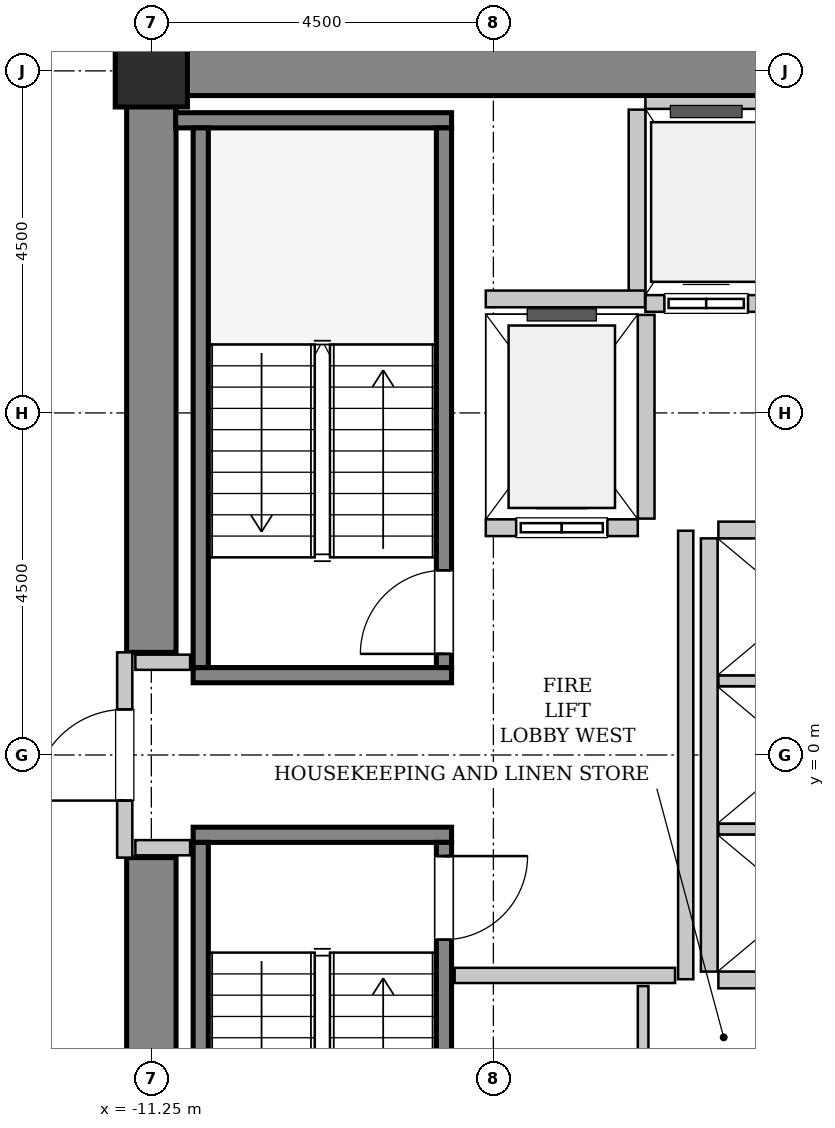
"""IFC4 building model, lengths in metres.
Left out: names, types, materials, properties, quantities, classifications, styles, units other than length and angle.
Written with IfcOpenShell. Run it as: python <this file> out.ifc"""

import sys

from ifc_helpers import new_model, si_unit, direction, frame, frame_2d, origin, origin_2d, place, context, subcontext, project, spatial, rectangle, hollow_rectangle, extrude, source, transform, mapped, element, fill, save


model = new_model("IFC4")
c1 = context("Model", 3, precision=1e-05, world=origin(), true_north=direction((0.0, 1.0)))
c2 = subcontext(c1, "Body", "Model", "MODEL_VIEW")
j1 = project(units=[si_unit("LENGTHUNIT", "METRE"), si_unit("PLANEANGLEUNIT", "RADIAN")], contexts=[c1])
p1 = place(None, origin())
s1 = spatial("IfcSite", under=j1, at=p1, CompositionType="ELEMENT")
p2 = place(p1, origin())
s2 = spatial("IfcBuilding", under=s1, at=p2, CompositionType="ELEMENT")
p3 = place(p2, frame((0.0, 0.0, 59.6)))
s3 = spatial("IfcBuildingStorey", under=s2, at=p3, CompositionType="ELEMENT", Elevation=59.6)
m1 = source(origin(), c2, "Body", "SweptSolid", [
    extrude(rectangle(XDim=10.025, YDim=0.65, at=frame_2d((5.012, 0.0))), origin(), (0.0, 0.0, 1.0), 3.8),
])
p4 = place(p3, frame((-11.575, 9.0, 0.0), z_axis=(0.0, 0.0, 1.0), x_axis=(1.0, 0.0, 0.0)))
e1 = element("IfcWall", 1, at=p4, inside=s3, PredefinedType="SHEAR", context=c2, shape_type="MappedRepresentation", body=[
    mapped(m1, transform((0.0, 0.0, 0.0), x_axis=(1.0, 0.0, 0.0), y_axis=(0.0, 1.0, 0.0), z_axis=(0.0, 0.0, 1.0), scale=1.0)),
])
m2 = source(origin(), c2, "Body", "SweptSolid", [
    extrude(rectangle(XDim=7.325, YDim=0.65, at=frame_2d((3.663, 0.0))), origin(), (0.0, 0.0, 1.0), 3.8),
])
for number, where, z_axis, x_axis in (
    (2, (-11.25, -8.675, 0.0), (0.0, 0.0, 1.0), (0.0, 1.0, 0.0)),
    (3, (-11.25, 1.35, 0.0), (0.0, 0.0, 1.0), (0.0, 1.0, 0.0)),
):
    element("IfcWall", number, at=place(p3, frame(where, z_axis=z_axis, x_axis=x_axis)), inside=s3, PredefinedType="SHEAR", context=c2, shape_type="MappedRepresentation", body=[
        mapped(m2, transform((0.0, 0.0, 0.0), x_axis=(1.0, 0.0, 0.0), y_axis=(0.0, 1.0, 0.0), z_axis=(0.0, 0.0, 1.0), scale=1.0)),
    ])
m3 = source(origin(), c2, "Body", "SweptSolid", [
    extrude(hollow_rectangle(XDim=0.95, YDim=0.95, WallThickness=0.045, InnerFilletRadius=0.045, OuterFilletRadius=0.09, at=origin_2d()), origin(), (0.0, 0.0, 1.0), 3.8),
])
p5 = place(p3, frame((-11.25, 9.0, 0.0), z_axis=(0.0, 0.0, 1.0), x_axis=(1.0, 0.0, 0.0)))
e4 = element("IfcColumn", 4, at=p5, inside=s3, PredefinedType="COLUMN", context=c2, shape_type="MappedRepresentation", body=[
    mapped(m3, transform((0.0, 0.0, 0.0), x_axis=(1.0, 0.0, 0.0), y_axis=(0.0, 1.0, 0.0), z_axis=(0.0, 0.0, 1.0), scale=1.0)),
])
m4 = source(origin(), c2, "Body", "SweptSolid", [
    extrude(rectangle(XDim=3.4, YDim=0.2, at=frame_2d((1.7, 0.0))), origin(), (0.0, 0.0, 1.0), 3.8),
])
p6 = place(p3, frame((-7.3, 1.05, 0.0), z_axis=(0.0, 0.0, 1.0), x_axis=(-1.0, 0.0, 0.0)))
e5 = element("IfcWall", 5, at=p6, inside=s3, PredefinedType="SOLIDWALL", context=c2, shape_type="MappedRepresentation", body=[
    mapped(m4, transform((0.0, 0.0, 0.0), x_axis=(1.0, 0.0, 0.0), y_axis=(0.0, 1.0, 0.0), z_axis=(0.0, 0.0, 1.0), scale=1.0)),
])
m5 = source(origin(), c2, "Body", "SweptSolid", [
    extrude(rectangle(XDim=3.63, YDim=0.2, at=frame_2d((1.815, 0.0))), origin(), (0.0, 0.0, 1.0), 3.8),
])
p7 = place(p3, frame((-7.3, 8.35, 0.0), z_axis=(0.0, 0.0, 1.0), x_axis=(-1.0, 0.0, 0.0)))
e6 = element("IfcWall", 6, at=p7, inside=s3, PredefinedType="SOLIDWALL", context=c2, shape_type="MappedRepresentation", body=[
    mapped(m5, transform((0.0, 0.0, 0.0), x_axis=(1.0, 0.0, 0.0), y_axis=(0.0, 1.0, 0.0), z_axis=(0.0, 0.0, 1.0), scale=1.0)),
])
m6 = source(origin(), c2, "Body", "SweptSolid", [
    extrude(rectangle(XDim=7.1, YDim=0.2, at=frame_2d((3.55, 0.0))), origin(), (0.0, 0.0, 1.0), 3.8),
])
p8 = place(p3, frame((-7.4, 1.15, 0.0), z_axis=(0.0, 0.0, 1.0), x_axis=(0.0, 1.0, 0.0)))
e7 = element("IfcWall", 7, at=p8, inside=s3, PredefinedType="SOLIDWALL", context=c2, shape_type="MappedRepresentation", body=[
    mapped(m6, transform((0.0, 0.0, 0.0), x_axis=(1.0, 0.0, 0.0), y_axis=(0.0, 1.0, 0.0), z_axis=(0.0, 0.0, 1.0), scale=1.0)),
])
p9 = place(p8, frame((0.18, 0.0, 0.0)))
e8 = element("IfcOpeningElement", 8, at=p9, cuts=e7, PredefinedType="OPENING", context=c2, shape_type="SweptSolid", body=[
    extrude(rectangle(XDim=1.1, YDim=2.15, at=frame_2d((0.55, 1.075))), frame((0.0, 0.11, 0.0), z_axis=(0.0, -1.0, 0.0), x_axis=(1.0, 0.0, 0.0)), (0.0, 0.0, 1.0), 0.22),
])
p10 = place(p3, frame((-10.6, 1.15, 0.0), z_axis=(0.0, 0.0, 1.0), x_axis=(0.0, 1.0, 0.0)))
e9 = element("IfcWall", 9, at=p10, inside=s3, PredefinedType="SOLIDWALL", context=c2, shape_type="MappedRepresentation", body=[
    mapped(m6, transform((0.0, 0.0, 0.0), x_axis=(1.0, 0.0, 0.0), y_axis=(0.0, 1.0, 0.0), z_axis=(0.0, 0.0, 1.0), scale=1.0)),
])
p11 = place(p3, frame((-10.7, -1.05, 0.0), z_axis=(0.0, 0.0, 1.0), x_axis=(1.0, 0.0, 0.0)))
e10 = element("IfcWall", 10, at=p11, inside=s3, PredefinedType="SOLIDWALL", context=c2, shape_type="MappedRepresentation", body=[
    mapped(m4, transform((0.0, 0.0, 0.0), x_axis=(1.0, 0.0, 0.0), y_axis=(0.0, 1.0, 0.0), z_axis=(0.0, 0.0, 1.0), scale=1.0)),
])
p12 = place(p3, frame((-10.6, -1.15, 0.0), z_axis=(0.0, 0.0, 1.0), x_axis=(0.0, -1.0, 0.0)))
e11 = element("IfcWall", 11, at=p12, inside=s3, PredefinedType="SOLIDWALL", context=c2, shape_type="MappedRepresentation", body=[
    mapped(m6, transform((0.0, 0.0, 0.0), x_axis=(1.0, 0.0, 0.0), y_axis=(0.0, 1.0, 0.0), z_axis=(0.0, 0.0, 1.0), scale=1.0)),
])
p13 = place(p3, frame((-7.4, -1.15, 0.0), z_axis=(0.0, 0.0, 1.0), x_axis=(0.0, -1.0, 0.0)))
e12 = element("IfcWall", 12, at=p13, inside=s3, PredefinedType="SOLIDWALL", context=c2, shape_type="MappedRepresentation", body=[
    mapped(m6, transform((0.0, 0.0, 0.0), x_axis=(1.0, 0.0, 0.0), y_axis=(0.0, 1.0, 0.0), z_axis=(0.0, 0.0, 1.0), scale=1.0)),
])
p14 = place(p13, frame((0.18, 0.0, 0.0)))
e13 = element("IfcOpeningElement", 13, at=p14, cuts=e12, PredefinedType="OPENING", context=c2, shape_type="SweptSolid", body=[
    extrude(rectangle(XDim=1.1, YDim=2.15, at=frame_2d((0.55, 1.075))), frame((0.0, 0.11, 0.0), z_axis=(0.0, -1.0, 0.0), x_axis=(1.0, 0.0, 0.0)), (0.0, 0.0, 1.0), 0.22),
])
m7 = source(origin(), c2, "Body", "SweptSolid", [
    extrude(rectangle(XDim=2.0, YDim=0.22, at=frame_2d((1.0, 0.0))), origin(), (0.0, 0.0, 1.0), 3.535),
])
p15 = place(p3, frame((-6.85, 2.99, 0.0), z_axis=(0.0, 0.0, 1.0), x_axis=(1.0, 0.0, 0.0)))
e14 = element("IfcWall", 14, at=p15, inside=s3, PredefinedType="SOLIDWALL", context=c2, shape_type="MappedRepresentation", body=[
    mapped(m7, transform((0.0, 0.0, 0.0), x_axis=(1.0, 0.0, 0.0), y_axis=(0.0, 1.0, 0.0), z_axis=(0.0, 0.0, 1.0), scale=1.0)),
])
p16 = place(p15, frame((0.4, 0.0, 0.0)))
e15 = element("IfcOpeningElement", 15, at=p16, cuts=e14, PredefinedType="OPENING", context=c2, shape_type="SweptSolid", body=[
    extrude(rectangle(XDim=1.2, YDim=2.2, at=frame_2d((0.6, 1.1))), frame((0.0, 0.12, 0.0), z_axis=(0.0, -1.0, 0.0), x_axis=(1.0, 0.0, 0.0)), (0.0, 0.0, 1.0), 0.24),
])
m8 = source(origin(), c2, "Body", "SweptSolid", [
    extrude(rectangle(XDim=2.68, YDim=0.22, at=frame_2d((1.34, 0.0))), origin(), (0.0, 0.0, 1.0), 3.535),
])
p17 = place(p3, frame((-4.74, 3.11, 0.0), z_axis=(0.0, 0.0, 1.0), x_axis=(0.0, 1.0, 0.0)))
e16 = element("IfcWall", 16, at=p17, inside=s3, PredefinedType="SOLIDWALL", context=c2, shape_type="MappedRepresentation", body=[
    mapped(m8, transform((0.0, 0.0, 0.0), x_axis=(1.0, 0.0, 0.0), y_axis=(0.0, 1.0, 0.0), z_axis=(0.0, 0.0, 1.0), scale=1.0)),
])
m9 = source(origin(), c2, "Body", "SweptSolid", [
    extrude(rectangle(XDim=3.2, YDim=0.22, at=frame_2d((1.6, 0.0))), origin(), (0.0, 0.0, 1.0), 3.535),
])
p18 = place(p3, frame((-4.75, 5.94, 0.0), z_axis=(0.0, 0.0, 1.0), x_axis=(1.0, 0.0, 0.0)))
e17 = element("IfcWall", 17, at=p18, inside=s3, PredefinedType="SOLIDWALL", context=c2, shape_type="MappedRepresentation", body=[
    mapped(m9, transform((0.0, 0.0, 0.0), x_axis=(1.0, 0.0, 0.0), y_axis=(0.0, 1.0, 0.0), z_axis=(0.0, 0.0, 1.0), scale=1.0)),
])
p19 = place(p18, frame((0.25, 0.0, 0.0)))
e18 = element("IfcOpeningElement", 18, at=p19, cuts=e17, PredefinedType="OPENING", context=c2, shape_type="SweptSolid", body=[
    extrude(rectangle(XDim=1.1, YDim=2.2, at=frame_2d((0.55, 1.1))), frame((0.0, 0.12, 0.0), z_axis=(0.0, -1.0, 0.0), x_axis=(1.0, 0.0, 0.0)), (0.0, 0.0, 1.0), 0.24),
])
p20 = place(p18, frame((1.875, 0.0, 0.0)))
e19 = element("IfcOpeningElement", 19, at=p20, cuts=e17, PredefinedType="OPENING", context=c2, shape_type="SweptSolid", body=[
    extrude(rectangle(XDim=1.1, YDim=2.2, at=frame_2d((0.55, 1.1))), frame((0.0, 0.12, 0.0), z_axis=(0.0, -1.0, 0.0), x_axis=(1.0, 0.0, 0.0)), (0.0, 0.0, 1.0), 0.24),
])
m10 = source(origin(), c2, "Body", "SweptSolid", [
    extrude(rectangle(XDim=3.2, YDim=0.16, at=frame_2d((1.6, 0.0))), origin(), (0.0, 0.0, 1.0), 2.425),
])
p21 = place(p3, frame((-1.55, 8.58, 0.0), z_axis=(0.0, 0.0, 1.0), x_axis=(-1.0, 0.0, 0.0)))
e20 = element("IfcWall", 20, at=p21, inside=s3, PredefinedType="PARTITIONING", context=c2, shape_type="MappedRepresentation", body=[
    mapped(m10, transform((0.0, 0.0, 0.0), x_axis=(1.0, 0.0, 0.0), y_axis=(0.0, 1.0, 0.0), z_axis=(0.0, 0.0, 1.0), scale=1.0)),
])
m11 = source(origin(), c2, "Body", "SweptSolid", [
    extrude(rectangle(XDim=2.43, YDim=0.22, at=frame_2d((1.215, 0.0))), origin(), (0.0, 0.0, 1.0), 3.535),
])
p22 = place(p3, frame((-4.86, 8.49, 0.0), z_axis=(0.0, 0.0, 1.0), x_axis=(0.0, -1.0, 0.0)))
e21 = element("IfcWall", 21, at=p22, inside=s3, PredefinedType="SOLIDWALL", context=c2, shape_type="MappedRepresentation", body=[
    mapped(m11, transform((0.0, 0.0, 0.0), x_axis=(1.0, 0.0, 0.0), y_axis=(0.0, 1.0, 0.0), z_axis=(0.0, 0.0, 1.0), scale=1.0)),
])
m12 = source(origin(), c2, "Body", "SweptSolid", [
    extrude(rectangle(XDim=5.7, YDim=0.22, at=frame_2d((2.85, 0.0))), origin(), (0.0, 0.0, 1.0), 3.535),
])
p23 = place(p3, frame((-3.91, 2.85, 0.0), z_axis=(0.0, 0.0, 1.0), x_axis=(0.0, -1.0, 0.0)))
e22 = element("IfcWall", 22, at=p23, inside=s3, PredefinedType="SOLIDWALL", context=c2, shape_type="MappedRepresentation", body=[
    mapped(m12, transform((0.0, 0.0, 0.0), x_axis=(1.0, 0.0, 0.0), y_axis=(0.0, 1.0, 0.0), z_axis=(0.0, 0.0, 1.0), scale=1.0)),
])
m13 = source(origin(), c2, "Body", "SweptSolid", [
    extrude(rectangle(XDim=2.13, YDim=0.22, at=frame_2d((1.065, 0.0))), origin(), (0.0, 0.0, 1.0), 3.535),
])
p24 = place(p3, frame((-3.79, -2.96, 0.0), z_axis=(0.0, 0.0, 1.0), x_axis=(1.0, 0.0, 0.0)))
e23 = element("IfcWall", 23, at=p24, inside=s3, PredefinedType="SOLIDWALL", context=c2, shape_type="MappedRepresentation", body=[
    mapped(m13, transform((0.0, 0.0, 0.0), x_axis=(1.0, 0.0, 0.0), y_axis=(0.0, 1.0, 0.0), z_axis=(0.0, 0.0, 1.0), scale=1.0)),
])
m14 = source(origin(), c2, "Body", "SweptSolid", [
    extrude(rectangle(XDim=2.13, YDim=0.14, at=frame_2d((1.065, 0.0))), origin(), (0.0, 0.0, 1.0), 3.535),
])
for number, where, z_axis, x_axis in (
    (24, (-3.79, -0.975, 0.0), (0.0, 0.0, 1.0), (1.0, 0.0, 0.0)),
    (25, (-3.79, 0.975, 0.0), (0.0, 0.0, 1.0), (1.0, 0.0, 0.0)),
):
    element("IfcWall", number, at=place(p3, frame(where, z_axis=z_axis, x_axis=x_axis)), inside=s3, PredefinedType="PARTITIONING", context=c2, shape_type="MappedRepresentation", body=[
        mapped(m14, transform((0.0, 0.0, 0.0), x_axis=(1.0, 0.0, 0.0), y_axis=(0.0, 1.0, 0.0), z_axis=(0.0, 0.0, 1.0), scale=1.0)),
    ])
p25 = place(p3, frame((-1.66, 2.96, 0.0), z_axis=(0.0, 0.0, 1.0), x_axis=(-1.0, 0.0, 0.0)))
e26 = element("IfcWall", 26, at=p25, inside=s3, PredefinedType="SOLIDWALL", context=c2, shape_type="MappedRepresentation", body=[
    mapped(m13, transform((0.0, 0.0, 0.0), x_axis=(1.0, 0.0, 0.0), y_axis=(0.0, 1.0, 0.0), z_axis=(0.0, 0.0, 1.0), scale=1.0)),
])
m15 = source(origin(), c2, "Body", "SweptSolid", [
    extrude(rectangle(XDim=2.095, YDim=0.22, at=frame_2d((1.048, 0.0))), origin(), (0.0, 0.0, 1.0), 3.535),
])
p26 = place(p3, frame((-6.85, 6.0, 0.0), z_axis=(0.0, 0.0, 1.0), x_axis=(1.0, 0.0, 0.0)))
e27 = element("IfcWall", 27, at=p26, inside=s3, PredefinedType="SOLIDWALL", context=c2, shape_type="MappedRepresentation", body=[
    mapped(m15, transform((0.0, 0.0, 0.0), x_axis=(1.0, 0.0, 0.0), y_axis=(0.0, 1.0, 0.0), z_axis=(0.0, 0.0, 1.0), scale=1.0)),
])
m16 = source(origin(), c2, "Body", "SweptSolid", [
    extrude(rectangle(XDim=2.7, YDim=0.2, at=frame_2d((1.35, 0.0))), origin(), (0.0, 0.0, 1.0), 2.425),
])
p27 = place(p3, frame((-11.6, -1.35, 0.0), z_axis=(0.0, 0.0, 1.0), x_axis=(0.0, 1.0, 0.0)))
e28 = element("IfcWall", 28, at=p27, inside=s3, PredefinedType="PARTITIONING", context=c2, shape_type="MappedRepresentation", body=[
    mapped(m16, transform((0.0, 0.0, 0.0), x_axis=(1.0, 0.0, 0.0), y_axis=(0.0, 1.0, 0.0), z_axis=(0.0, 0.0, 1.0), scale=1.0)),
])
p28 = place(p27, frame((0.75, 0.0, 0.0)))
e29 = element("IfcOpeningElement", 29, at=p28, cuts=e28, PredefinedType="OPENING", context=c2, shape_type="SweptSolid", body=[
    extrude(rectangle(XDim=1.2, YDim=2.15, at=frame_2d((0.6, 1.075))), frame((0.0, 0.11, 0.0), z_axis=(0.0, -1.0, 0.0), x_axis=(1.0, 0.0, 0.0)), (0.0, 0.0, 1.0), 0.22),
])
m17 = source(origin(), c2, "Body", "SweptSolid", [
    extrude(rectangle(XDim=5.9, YDim=0.2, at=frame_2d((2.95, 0.0))), origin(), (0.0, 0.0, 1.0), 3.535),
])
p29 = place(p3, frame((-4.22, -2.95, 0.0), z_axis=(0.0, 0.0, 1.0), x_axis=(0.0, 1.0, 0.0)))
e30 = element("IfcWall", 30, at=p29, inside=s3, PredefinedType="PARTITIONING", context=c2, shape_type="MappedRepresentation", body=[
    mapped(m17, transform((0.0, 0.0, 0.0), x_axis=(1.0, 0.0, 0.0), y_axis=(0.0, 1.0, 0.0), z_axis=(0.0, 0.0, 1.0), scale=1.0)),
])
m18 = source(origin(), c2, "Body", "SweptSolid", [
    extrude(rectangle(XDim=2.9, YDim=0.2, at=frame_2d((1.45, 0.0))), origin(), (0.0, 0.0, 1.0), 3.535),
])
p30 = place(p3, frame((-7.26, -2.9, 0.0), z_axis=(0.0, 0.0, 1.0), x_axis=(1.0, 0.0, 0.0)))
e31 = element("IfcWall", 31, at=p30, inside=s3, PredefinedType="PARTITIONING", context=c2, shape_type="MappedRepresentation", body=[
    mapped(m18, transform((0.0, 0.0, 0.0), x_axis=(1.0, 0.0, 0.0), y_axis=(0.0, 1.0, 0.0), z_axis=(0.0, 0.0, 1.0), scale=1.0)),
])
m19 = source(origin(), c2, "Body", "SweptSolid", [
    extrude(rectangle(XDim=0.72, YDim=0.2, at=frame_2d((0.36, 0.0))), origin(), (0.0, 0.0, 1.0), 3.535),
])
for number, where, z_axis, x_axis in (
    (32, (-11.46, 1.22, 0.0), (0.0, 0.0, 1.0), (1.0, 0.0, 0.0)),
    (33, (-11.46, -1.22, 0.0), (0.0, 0.0, 1.0), (1.0, 0.0, 0.0)),
):
    element("IfcWall", number, at=place(p3, frame(where, z_axis=z_axis, x_axis=x_axis)), inside=s3, PredefinedType="PARTITIONING", context=c2, shape_type="MappedRepresentation", body=[
        mapped(m19, transform((0.0, 0.0, 0.0), x_axis=(1.0, 0.0, 0.0), y_axis=(0.0, 1.0, 0.0), z_axis=(0.0, 0.0, 1.0), scale=1.0)),
    ])
m20 = source(origin(), c2, "Body", "SweptSolid", [
    extrude(rectangle(XDim=1.26, YDim=0.14, at=frame_2d((0.63, 0.0))), origin(), (0.0, 0.0, 1.0), 3.535),
])
p31 = place(p3, frame((-4.78, -4.3, 0.0), z_axis=(0.0, 0.0, 1.0), x_axis=(0.0, 1.0, 0.0)))
e34 = element("IfcWall", 34, at=p31, inside=s3, PredefinedType="PARTITIONING", context=c2, shape_type="MappedRepresentation", body=[
    mapped(m20, transform((0.0, 0.0, 0.0), x_axis=(1.0, 0.0, 0.0), y_axis=(0.0, 1.0, 0.0), z_axis=(0.0, 0.0, 1.0), scale=1.0)),
])
m21 = source(origin(), c2, "Body", "SweptSolid", [
    extrude(rectangle(XDim=1.1, YDim=2.15, at=frame_2d((0.55, 1.075))), frame((0.0, 0.025, 0.0), z_axis=(0.0, -1.0, 0.0), x_axis=(1.0, 0.0, 0.0)), (0.0, 0.0, 1.0), 0.05),
])
p32 = place(p9, origin())
e35 = element("IfcDoor", 35, at=p32, inside=s3, OperationType="SINGLE_SWING_LEFT", PredefinedType="DOOR", context=c2, shape_type="MappedRepresentation", body=[
    mapped(m21, transform((0.0, 0.0, 0.0), x_axis=(1.0, 0.0, 0.0), y_axis=(0.0, 1.0, 0.0), z_axis=(0.0, 0.0, 1.0), scale=1.0)),
])
fill(e8, e35)
p33 = place(p14, origin())
e36 = element("IfcDoor", 36, at=p33, inside=s3, OperationType="SINGLE_SWING_LEFT", PredefinedType="DOOR", context=c2, shape_type="MappedRepresentation", body=[
    mapped(m21, transform((0.0, 0.0, 0.0), x_axis=(1.0, 0.0, 0.0), y_axis=(0.0, 1.0, 0.0), z_axis=(0.0, 0.0, 1.0), scale=1.0)),
])
fill(e13, e36)
m22 = source(origin(), c2, "Body", "SweptSolid", [
    extrude(rectangle(XDim=1.2, YDim=2.2, at=frame_2d((0.6, 1.1))), frame((0.0, 0.025, 0.0), z_axis=(0.0, -1.0, 0.0), x_axis=(1.0, 0.0, 0.0)), (0.0, 0.0, 1.0), 0.05),
])
p34 = place(p16, origin())
e37 = element("IfcDoor", 37, at=p34, inside=s3, OperationType="SLIDING_TO_LEFT", PredefinedType="DOOR", context=c2, shape_type="MappedRepresentation", body=[
    mapped(m22, transform((0.0, 0.0, 0.0), x_axis=(1.0, 0.0, 0.0), y_axis=(0.0, 1.0, 0.0), z_axis=(0.0, 0.0, 1.0), scale=1.0)),
])
fill(e15, e37)
m23 = source(origin(), c2, "Body", "SweptSolid", [
    extrude(rectangle(XDim=1.1, YDim=2.2, at=frame_2d((0.55, 1.1))), frame((0.0, 0.025, 0.0), z_axis=(0.0, -1.0, 0.0), x_axis=(1.0, 0.0, 0.0)), (0.0, 0.0, 1.0), 0.05),
])
p35 = place(p19, origin())
e38 = element("IfcDoor", 38, at=p35, inside=s3, OperationType="DOUBLE_DOOR_SLIDING", PredefinedType="DOOR", context=c2, shape_type="MappedRepresentation", body=[
    mapped(m23, transform((0.0, 0.0, 0.0), x_axis=(1.0, 0.0, 0.0), y_axis=(0.0, 1.0, 0.0), z_axis=(0.0, 0.0, 1.0), scale=1.0)),
])
fill(e18, e38)
m24 = source(origin(), c2, "Body", "SweptSolid", [
    extrude(rectangle(XDim=1.2, YDim=2.15, at=frame_2d((0.6, 1.075))), frame((0.0, 0.025, 0.0), z_axis=(0.0, -1.0, 0.0), x_axis=(1.0, 0.0, 0.0)), (0.0, 0.0, 1.0), 0.05),
])
p36 = place(p28, origin())
e39 = element("IfcDoor", 39, at=p36, inside=s3, OperationType="SINGLE_SWING_LEFT", PredefinedType="DOOR", context=c2, shape_type="MappedRepresentation", body=[
    mapped(m24, transform((0.0, 0.0, 0.0), x_axis=(1.0, 0.0, 0.0), y_axis=(0.0, 1.0, 0.0), z_axis=(0.0, 0.0, 1.0), scale=1.0)),
])
fill(e29, e39)
save(model, sys.argv[1])
